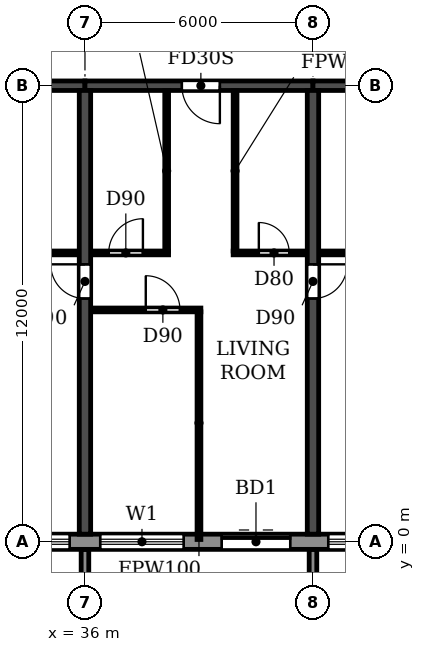
"""IFC4 building model, lengths in metres.
Left out: names, types, materials, properties, quantities, classifications, styles, units other than length and angle.
Written with IfcOpenShell. Run it as: python <this file> out.ifc"""

import sys

from ifc_helpers import new_model, si_unit, direction, frame, frame_2d, origin, place, context, subcontext, project, spatial, polyline, rectangle, outline, extrude, source, transform, mapped, element, fill, save


model = new_model("IFC4")
c1 = context("Model", 3, precision=1e-05, world=origin(), true_north=direction((0.0, 1.0)))
c2 = subcontext(c1, "Body", "Model", "MODEL_VIEW")
j1 = project(units=[si_unit("LENGTHUNIT", "METRE"), si_unit("PLANEANGLEUNIT", "RADIAN")], contexts=[c1])
p1 = place(None, origin())
s1 = spatial("IfcSite", under=j1, at=p1, CompositionType="ELEMENT")
p2 = place(p1, origin())
s2 = spatial("IfcBuilding", under=s1, at=p2, CompositionType="ELEMENT")
p3 = place(p2, frame((0.0, 0.0, 152.1)))
s3 = spatial("IfcBuildingStorey", under=s2, at=p3, CompositionType="ELEMENT", Elevation=152.1)
p4 = place(p3, frame((36.0, 0.2, 0.0), z_axis=(0.0, 0.0, 1.0), x_axis=(0.0, 1.0, 0.0)))
e1 = element("IfcWall", 1, at=p4, inside=s3, PredefinedType="SHEAR", context=c2, shape_type="SweptSolid", body=[
    extrude(rectangle(XDim=11.675, YDim=0.3, at=frame_2d((5.837, 0.0))), origin(), (0.0, 0.0, 1.0), 3.07),
])
p5 = place(p4, frame((6.2, 0.0, 0.0)))
e2 = element("IfcOpeningElement", 2, at=p5, cuts=e1, PredefinedType="OPENING", context=c2, shape_type="SweptSolid", body=[
    extrude(rectangle(XDim=0.9, YDim=2.1, at=frame_2d((0.45, 1.05))), frame((0.0, 0.16, 0.0), z_axis=(0.0, -1.0, 0.0), x_axis=(1.0, 0.0, 0.0)), (0.0, 0.0, 1.0), 0.32),
])
p6 = place(p3, frame((42.0, 0.2, 0.0), z_axis=(0.0, 0.0, 1.0), x_axis=(0.0, 1.0, 0.0)))
e3 = element("IfcWall", 3, at=p6, inside=s3, PredefinedType="SHEAR", context=c2, shape_type="SweptSolid", body=[
    extrude(rectangle(XDim=11.675, YDim=0.3, at=frame_2d((5.837, 0.0))), origin(), (0.0, 0.0, 1.0), 3.07),
])
p7 = place(p6, frame((6.2, 0.0, 0.0)))
e4 = element("IfcOpeningElement", 4, at=p7, cuts=e3, PredefinedType="OPENING", context=c2, shape_type="SweptSolid", body=[
    extrude(rectangle(XDim=0.9, YDim=2.1, at=frame_2d((0.45, 1.05))), frame((0.0, 0.16, 0.0), z_axis=(0.0, -1.0, 0.0), x_axis=(1.0, 0.0, 0.0)), (0.0, 0.0, 1.0), 0.32),
])
p8 = place(p3, frame((30.0, 12.0, 0.0), z_axis=(0.0, 0.0, 1.0), x_axis=(1.0, 0.0, 0.0)))
e5 = element("IfcWall", 5, at=p8, inside=s3, PredefinedType="SHEAR", context=c2, shape_type="SweptSolid", body=[
    extrude(rectangle(XDim=6.0, YDim=0.25, at=frame_2d((3.0, 0.0))), origin(), (0.0, 0.0, 1.0), 2.47),
])
p9 = place(p3, frame((36.0, 12.0, 0.0), z_axis=(0.0, 0.0, 1.0), x_axis=(1.0, 0.0, 0.0)))
e6 = element("IfcWall", 6, at=p9, inside=s3, PredefinedType="SHEAR", context=c2, shape_type="SweptSolid", body=[
    extrude(rectangle(XDim=6.0, YDim=0.25, at=frame_2d((3.0, 0.0))), origin(), (0.0, 0.0, 1.0), 2.47),
])
p10 = place(p9, frame((2.55, 0.0, 0.0)))
e7 = element("IfcOpeningElement", 7, at=p10, cuts=e6, PredefinedType="OPENING", context=c2, shape_type="SweptSolid", body=[
    extrude(rectangle(XDim=1.0, YDim=2.1, at=frame_2d((0.5, 1.05))), frame((0.0, 0.135, 0.0), z_axis=(0.0, -1.0, 0.0), x_axis=(1.0, 0.0, 0.0)), (0.0, 0.0, 1.0), 0.27),
])
p11 = place(p3, frame((42.0, 12.0, 0.0), z_axis=(0.0, 0.0, 1.0), x_axis=(1.0, 0.0, 0.0)))
e8 = element("IfcWall", 8, at=p11, inside=s3, PredefinedType="SHEAR", context=c2, shape_type="SweptSolid", body=[
    extrude(rectangle(XDim=6.0, YDim=0.25, at=frame_2d((3.0, 0.0))), origin(), (0.0, 0.0, 1.0), 2.47),
])
p12 = place(p3, frame((16.683, 0.0, 0.0), z_axis=(0.0, 0.0, 1.0), x_axis=(1.0, 0.0, 0.0)))
e9 = element("IfcWall", 9, at=p12, inside=s3, PredefinedType="STANDARD", context=c2, shape_type="SweptSolid", body=[
    extrude(rectangle(XDim=68.634, YDim=0.4, at=frame_2d((34.317, 0.0))), origin(), (0.0, 0.0, 1.0), 3.07),
])
p13 = place(p12, frame((1.717, 0.0, 0.9)))
e10 = element("IfcOpeningElement", 10, at=p13, cuts=e9, PredefinedType="OPENING", context=c2, shape_type="SweptSolid", body=[
    extrude(rectangle(XDim=2.2, YDim=1.5, at=frame_2d((1.1, 0.75))), frame((0.0, 0.21, 0.0), z_axis=(0.0, -1.0, 0.0), x_axis=(1.0, 0.0, 0.0)), (0.0, 0.0, 1.0), 0.42),
])
p14 = place(p12, frame((4.717, 0.0, 0.9)))
e11 = element("IfcOpeningElement", 11, at=p14, cuts=e9, PredefinedType="OPENING", context=c2, shape_type="SweptSolid", body=[
    extrude(rectangle(XDim=2.2, YDim=1.5, at=frame_2d((1.1, 0.75))), frame((0.0, 0.21, 0.0), z_axis=(0.0, -1.0, 0.0), x_axis=(1.0, 0.0, 0.0)), (0.0, 0.0, 1.0), 0.42),
])
p15 = place(p12, frame((7.917, 0.0, 0.0)))
e12 = element("IfcOpeningElement", 12, at=p15, cuts=e9, PredefinedType="OPENING", context=c2, shape_type="SweptSolid", body=[
    extrude(rectangle(XDim=1.8, YDim=2.4, at=frame_2d((0.9, 1.2))), frame((0.0, 0.21, 0.0), z_axis=(0.0, -1.0, 0.0), x_axis=(1.0, 0.0, 0.0)), (0.0, 0.0, 1.0), 0.42),
])
p16 = place(p12, frame((10.717, 0.0, 0.9)))
e13 = element("IfcOpeningElement", 13, at=p16, cuts=e9, PredefinedType="OPENING", context=c2, shape_type="SweptSolid", body=[
    extrude(rectangle(XDim=2.2, YDim=1.5, at=frame_2d((1.1, 0.75))), frame((0.0, 0.21, 0.0), z_axis=(0.0, -1.0, 0.0), x_axis=(1.0, 0.0, 0.0)), (0.0, 0.0, 1.0), 0.42),
])
p17 = place(p12, frame((13.717, 0.0, 0.9)))
e14 = element("IfcOpeningElement", 14, at=p17, cuts=e9, PredefinedType="OPENING", context=c2, shape_type="SweptSolid", body=[
    extrude(rectangle(XDim=2.2, YDim=1.5, at=frame_2d((1.1, 0.75))), frame((0.0, 0.21, 0.0), z_axis=(0.0, -1.0, 0.0), x_axis=(1.0, 0.0, 0.0)), (0.0, 0.0, 1.0), 0.42),
])
p18 = place(p12, frame((16.717, 0.0, 0.9)))
e15 = element("IfcOpeningElement", 15, at=p18, cuts=e9, PredefinedType="OPENING", context=c2, shape_type="SweptSolid", body=[
    extrude(rectangle(XDim=2.2, YDim=1.5, at=frame_2d((1.1, 0.75))), frame((0.0, 0.21, 0.0), z_axis=(0.0, -1.0, 0.0), x_axis=(1.0, 0.0, 0.0)), (0.0, 0.0, 1.0), 0.42),
])
p19 = place(p12, frame((19.717, 0.0, 0.9)))
e16 = element("IfcOpeningElement", 16, at=p19, cuts=e9, PredefinedType="OPENING", context=c2, shape_type="SweptSolid", body=[
    extrude(rectangle(XDim=2.2, YDim=1.5, at=frame_2d((1.1, 0.75))), frame((0.0, 0.21, 0.0), z_axis=(0.0, -1.0, 0.0), x_axis=(1.0, 0.0, 0.0)), (0.0, 0.0, 1.0), 0.42),
])
p20 = place(p12, frame((22.917, 0.0, 0.0)))
e17 = element("IfcOpeningElement", 17, at=p20, cuts=e9, PredefinedType="OPENING", context=c2, shape_type="SweptSolid", body=[
    extrude(rectangle(XDim=1.8, YDim=2.4, at=frame_2d((0.9, 1.2))), frame((0.0, 0.21, 0.0), z_axis=(0.0, -1.0, 0.0), x_axis=(1.0, 0.0, 0.0)), (0.0, 0.0, 1.0), 0.42),
])
p21 = place(p12, frame((25.717, 0.0, 0.9)))
e18 = element("IfcOpeningElement", 18, at=p21, cuts=e9, PredefinedType="OPENING", context=c2, shape_type="SweptSolid", body=[
    extrude(rectangle(XDim=2.2, YDim=1.5, at=frame_2d((1.1, 0.75))), frame((0.0, 0.21, 0.0), z_axis=(0.0, -1.0, 0.0), x_axis=(1.0, 0.0, 0.0)), (0.0, 0.0, 1.0), 0.42),
])
p22 = place(p12, frame((28.717, 0.0, 0.9)))
e19 = element("IfcOpeningElement", 19, at=p22, cuts=e9, PredefinedType="OPENING", context=c2, shape_type="SweptSolid", body=[
    extrude(rectangle(XDim=2.2, YDim=1.5, at=frame_2d((1.1, 0.75))), frame((0.0, 0.21, 0.0), z_axis=(0.0, -1.0, 0.0), x_axis=(1.0, 0.0, 0.0)), (0.0, 0.0, 1.0), 0.42),
])
p23 = place(p12, frame((31.917, 0.0, 0.0)))
e20 = element("IfcOpeningElement", 20, at=p23, cuts=e9, PredefinedType="OPENING", context=c2, shape_type="SweptSolid", body=[
    extrude(rectangle(XDim=1.8, YDim=2.4, at=frame_2d((0.9, 1.2))), frame((0.0, 0.21, 0.0), z_axis=(0.0, -1.0, 0.0), x_axis=(1.0, 0.0, 0.0)), (0.0, 0.0, 1.0), 0.42),
])
p24 = place(p12, frame((34.717, 0.0, 0.9)))
e21 = element("IfcOpeningElement", 21, at=p24, cuts=e9, PredefinedType="OPENING", context=c2, shape_type="SweptSolid", body=[
    extrude(rectangle(XDim=2.2, YDim=1.5, at=frame_2d((1.1, 0.75))), frame((0.0, 0.21, 0.0), z_axis=(0.0, -1.0, 0.0), x_axis=(1.0, 0.0, 0.0)), (0.0, 0.0, 1.0), 0.42),
])
p25 = place(p12, frame((37.717, 0.0, 0.9)))
e22 = element("IfcOpeningElement", 22, at=p25, cuts=e9, PredefinedType="OPENING", context=c2, shape_type="SweptSolid", body=[
    extrude(rectangle(XDim=2.2, YDim=1.5, at=frame_2d((1.1, 0.75))), frame((0.0, 0.21, 0.0), z_axis=(0.0, -1.0, 0.0), x_axis=(1.0, 0.0, 0.0)), (0.0, 0.0, 1.0), 0.42),
])
p26 = place(p12, frame((40.717, 0.0, 0.9)))
e23 = element("IfcOpeningElement", 23, at=p26, cuts=e9, PredefinedType="OPENING", context=c2, shape_type="SweptSolid", body=[
    extrude(rectangle(XDim=2.2, YDim=1.5, at=frame_2d((1.1, 0.75))), frame((0.0, 0.21, 0.0), z_axis=(0.0, -1.0, 0.0), x_axis=(1.0, 0.0, 0.0)), (0.0, 0.0, 1.0), 0.42),
])
p27 = place(p12, frame((43.717, 0.0, 0.9)))
e24 = element("IfcOpeningElement", 24, at=p27, cuts=e9, PredefinedType="OPENING", context=c2, shape_type="SweptSolid", body=[
    extrude(rectangle(XDim=2.2, YDim=1.5, at=frame_2d((1.1, 0.75))), frame((0.0, 0.21, 0.0), z_axis=(0.0, -1.0, 0.0), x_axis=(1.0, 0.0, 0.0)), (0.0, 0.0, 1.0), 0.42),
])
p28 = place(p12, frame((46.917, 0.0, 0.0)))
e25 = element("IfcOpeningElement", 25, at=p28, cuts=e9, PredefinedType="OPENING", context=c2, shape_type="SweptSolid", body=[
    extrude(rectangle(XDim=1.8, YDim=2.4, at=frame_2d((0.9, 1.2))), frame((0.0, 0.21, 0.0), z_axis=(0.0, -1.0, 0.0), x_axis=(1.0, 0.0, 0.0)), (0.0, 0.0, 1.0), 0.42),
])
p29 = place(p12, frame((49.717, 0.0, 0.9)))
e26 = element("IfcOpeningElement", 26, at=p29, cuts=e9, PredefinedType="OPENING", context=c2, shape_type="SweptSolid", body=[
    extrude(rectangle(XDim=2.2, YDim=1.5, at=frame_2d((1.1, 0.75))), frame((0.0, 0.21, 0.0), z_axis=(0.0, -1.0, 0.0), x_axis=(1.0, 0.0, 0.0)), (0.0, 0.0, 1.0), 0.42),
])
p30 = place(p12, frame((52.717, 0.0, 0.9)))
e27 = element("IfcOpeningElement", 27, at=p30, cuts=e9, PredefinedType="OPENING", context=c2, shape_type="SweptSolid", body=[
    extrude(rectangle(XDim=2.2, YDim=1.5, at=frame_2d((1.1, 0.75))), frame((0.0, 0.21, 0.0), z_axis=(0.0, -1.0, 0.0), x_axis=(1.0, 0.0, 0.0)), (0.0, 0.0, 1.0), 0.42),
])
p31 = place(p12, frame((55.717, 0.0, 0.9)))
e28 = element("IfcOpeningElement", 28, at=p31, cuts=e9, PredefinedType="OPENING", context=c2, shape_type="SweptSolid", body=[
    extrude(rectangle(XDim=2.2, YDim=1.5, at=frame_2d((1.1, 0.75))), frame((0.0, 0.21, 0.0), z_axis=(0.0, -1.0, 0.0), x_axis=(1.0, 0.0, 0.0)), (0.0, 0.0, 1.0), 0.42),
])
p32 = place(p12, frame((58.917, 0.0, 0.0)))
e29 = element("IfcOpeningElement", 29, at=p32, cuts=e9, PredefinedType="OPENING", context=c2, shape_type="SweptSolid", body=[
    extrude(rectangle(XDim=1.8, YDim=2.4, at=frame_2d((0.9, 1.2))), frame((0.0, 0.21, 0.0), z_axis=(0.0, -1.0, 0.0), x_axis=(1.0, 0.0, 0.0)), (0.0, 0.0, 1.0), 0.42),
])
p33 = place(p12, frame((61.717, 0.0, 0.9)))
e30 = element("IfcOpeningElement", 30, at=p33, cuts=e9, PredefinedType="OPENING", context=c2, shape_type="SweptSolid", body=[
    extrude(rectangle(XDim=2.2, YDim=1.5, at=frame_2d((1.1, 0.75))), frame((0.0, 0.21, 0.0), z_axis=(0.0, -1.0, 0.0), x_axis=(1.0, 0.0, 0.0)), (0.0, 0.0, 1.0), 0.42),
])
p34 = place(p12, frame((64.717, 0.0, 0.9)))
e31 = element("IfcOpeningElement", 31, at=p34, cuts=e9, PredefinedType="OPENING", context=c2, shape_type="SweptSolid", body=[
    extrude(rectangle(XDim=2.2, YDim=1.5, at=frame_2d((1.1, 0.75))), frame((0.0, 0.21, 0.0), z_axis=(0.0, -1.0, 0.0), x_axis=(1.0, 0.0, 0.0)), (0.0, 0.0, 1.0), 0.42),
])
m1 = source(origin(), c2, "Body", "SweptSolid", [
    extrude(outline(polyline([(0.0, 0.0), (0.2, 0.0), (0.2, 1.65), (0.0, 1.65), (0.0, 0.0)])), origin(), (0.0, 0.0, 1.0), 3.1),
])
for number, where in (
    (32, (35.9, -1.85, 0.0)),
    (33, (41.9, -1.85, 0.0)),
):
    element("IfcWall", number, at=place(p3, frame(where)), inside=s3, PredefinedType="STANDARD", context=c2, shape_type="MappedRepresentation", body=[
        mapped(m1, transform((0.0, 0.0, 0.0))),
    ])
p35 = place(p3, frame((36.16, 6.1, 0.0), z_axis=(0.0, 0.0, 1.0), x_axis=(1.0, 0.0, 0.0)))
e34 = element("IfcWall", 34, at=p35, inside=s3, PredefinedType="PARTITIONING", context=c2, shape_type="SweptSolid", body=[
    extrude(rectangle(XDim=2.89, YDim=0.1, at=frame_2d((1.445, 0.0))), origin(), (0.0, 0.0, 1.0), 3.07),
])
p36 = place(p35, frame((1.44, 0.0, 0.0)))
e35 = element("IfcOpeningElement", 35, at=p36, cuts=e34, PredefinedType="OPENING", context=c2, shape_type="SweptSolid", body=[
    extrude(rectangle(XDim=0.9, YDim=2.1, at=frame_2d((0.45, 1.05))), frame((0.0, 0.06, 0.0), z_axis=(0.0, -1.0, 0.0), x_axis=(1.0, 0.0, 0.0)), (0.0, 0.0, 1.0), 0.12),
])
p37 = place(p3, frame((32.9, 7.6, 0.0), z_axis=(0.0, 0.0, 1.0), x_axis=(1.0, 0.0, 0.0)))
e36 = element("IfcWall", 36, at=p37, inside=s3, PredefinedType="PARTITIONING", context=c2, shape_type="SweptSolid", body=[
    extrude(rectangle(XDim=2.94, YDim=0.1, at=frame_2d((1.47, 0.0))), origin(), (0.0, 0.0, 1.0), 3.07),
])
p38 = place(p37, frame((1.2, 0.0, 0.0)))
e37 = element("IfcOpeningElement", 37, at=p38, cuts=e36, PredefinedType="OPENING", context=c2, shape_type="SweptSolid", body=[
    extrude(rectangle(XDim=0.8, YDim=2.1, at=frame_2d((0.4, 1.05))), frame((0.0, 0.06, 0.0), z_axis=(0.0, -1.0, 0.0), x_axis=(1.0, 0.0, 0.0)), (0.0, 0.0, 1.0), 0.12),
])
p39 = place(p3, frame((36.16, 7.6, 0.0), z_axis=(0.0, 0.0, 1.0), x_axis=(1.0, 0.0, 0.0)))
e38 = element("IfcWall", 38, at=p39, inside=s3, PredefinedType="PARTITIONING", context=c2, shape_type="SweptSolid", body=[
    extrude(rectangle(XDim=2.04, YDim=0.1, at=frame_2d((1.02, 0.0))), origin(), (0.0, 0.0, 1.0), 3.07),
])
p40 = place(p39, frame((0.465, 0.0, 0.0)))
e39 = element("IfcOpeningElement", 39, at=p40, cuts=e38, PredefinedType="OPENING", context=c2, shape_type="SweptSolid", body=[
    extrude(rectangle(XDim=0.9, YDim=2.1, at=frame_2d((0.45, 1.05))), frame((0.0, 0.06, 0.0), z_axis=(0.0, -1.0, 0.0), x_axis=(1.0, 0.0, 0.0)), (0.0, 0.0, 1.0), 0.12),
])
p41 = place(p3, frame((39.9, 7.6, 0.0), z_axis=(0.0, 0.0, 1.0), x_axis=(1.0, 0.0, 0.0)))
e40 = element("IfcWall", 40, at=p41, inside=s3, PredefinedType="PARTITIONING", context=c2, shape_type="SweptSolid", body=[
    extrude(rectangle(XDim=1.94, YDim=0.1, at=frame_2d((0.97, 0.0))), origin(), (0.0, 0.0, 1.0), 3.07),
])
p42 = place(p41, frame((0.675, 0.0, 0.0)))
e41 = element("IfcOpeningElement", 41, at=p42, cuts=e40, PredefinedType="OPENING", context=c2, shape_type="SweptSolid", body=[
    extrude(rectangle(XDim=0.8, YDim=2.1, at=frame_2d((0.4, 1.05))), frame((0.0, 0.06, 0.0), z_axis=(0.0, -1.0, 0.0), x_axis=(1.0, 0.0, 0.0)), (0.0, 0.0, 1.0), 0.12),
])
p43 = place(p3, frame((42.16, 7.6, 0.0), z_axis=(0.0, 0.0, 1.0), x_axis=(1.0, 0.0, 0.0)))
e42 = element("IfcWall", 42, at=p43, inside=s3, PredefinedType="PARTITIONING", context=c2, shape_type="SweptSolid", body=[
    extrude(rectangle(XDim=2.74, YDim=0.1, at=frame_2d((1.37, 0.0))), origin(), (0.0, 0.0, 1.0), 3.07),
])
p44 = place(p43, frame((0.94, 0.0, 0.0)))
e43 = element("IfcOpeningElement", 43, at=p44, cuts=e42, PredefinedType="OPENING", context=c2, shape_type="SweptSolid", body=[
    extrude(rectangle(XDim=0.8, YDim=2.1, at=frame_2d((0.4, 1.05))), frame((0.0, 0.06, 0.0), z_axis=(0.0, -1.0, 0.0), x_axis=(1.0, 0.0, 0.0)), (0.0, 0.0, 1.0), 0.12),
])
p45 = place(p3, frame((38.15, 7.65, 0.0), z_axis=(0.0, 0.0, 1.0), x_axis=(0.0, 1.0, 0.0)))
e44 = element("IfcWall", 44, at=p45, inside=s3, PredefinedType="PARTITIONING", context=c2, shape_type="SweptSolid", body=[
    extrude(rectangle(XDim=4.215, YDim=0.1, at=frame_2d((2.107, 0.0))), origin(), (0.0, 0.0, 1.0), 3.07),
])
p46 = place(p3, frame((39.0, 0.06, 0.0), z_axis=(0.0, 0.0, 1.0), x_axis=(0.0, 1.0, 0.0)))
e45 = element("IfcWall", 45, at=p46, inside=s3, PredefinedType="PARTITIONING", context=c2, shape_type="SweptSolid", body=[
    extrude(rectangle(XDim=5.99, YDim=0.1, at=frame_2d((2.995, 0.0))), origin(), (0.0, 0.0, 1.0), 3.07),
])
p47 = place(p3, frame((39.95, 7.65, 0.0), z_axis=(0.0, 0.0, 1.0), x_axis=(0.0, 1.0, 0.0)))
e46 = element("IfcWall", 46, at=p47, inside=s3, PredefinedType="PARTITIONING", context=c2, shape_type="SweptSolid", body=[
    extrude(rectangle(XDim=4.215, YDim=0.1, at=frame_2d((2.107, 0.0))), origin(), (0.0, 0.0, 1.0), 3.07),
])
p48 = place(p18, origin())
e47 = element("IfcWindow", 47, at=p48, inside=s3, PartitioningType="DOUBLE_PANEL_HORIZONTAL", PredefinedType="WINDOW", context=c2, shape_type="SweptSolid", body=[
    extrude(rectangle(XDim=2.2, YDim=1.5, at=frame_2d((1.1, 0.75))), frame((0.0, 0.03, 0.0), z_axis=(0.0, -1.0, 0.0), x_axis=(1.0, 0.0, 0.0)), (0.0, 0.0, 1.0), 0.06),
])
fill(e15, e47)
p49 = place(p19, origin())
e48 = element("IfcWindow", 48, at=p49, inside=s3, PartitioningType="DOUBLE_PANEL_HORIZONTAL", PredefinedType="WINDOW", context=c2, shape_type="SweptSolid", body=[
    extrude(rectangle(XDim=2.2, YDim=1.5, at=frame_2d((1.1, 0.75))), frame((0.0, 0.03, 0.0), z_axis=(0.0, -1.0, 0.0), x_axis=(1.0, 0.0, 0.0)), (0.0, 0.0, 1.0), 0.06),
])
fill(e16, e48)
p50 = place(p20, origin())
e49 = element("IfcDoor", 49, at=p50, inside=s3, OperationType="DOUBLE_DOOR_SLIDING", PredefinedType="DOOR", context=c2, shape_type="SweptSolid", body=[
    extrude(rectangle(XDim=1.8, YDim=2.4, at=frame_2d((0.9, 1.2))), frame((0.0, 0.025, 0.0), z_axis=(0.0, -1.0, 0.0), x_axis=(1.0, 0.0, 0.0)), (0.0, 0.0, 1.0), 0.05),
])
fill(e17, e49)
p51 = place(p21, origin())
e50 = element("IfcWindow", 50, at=p51, inside=s3, PartitioningType="DOUBLE_PANEL_HORIZONTAL", PredefinedType="WINDOW", context=c2, shape_type="SweptSolid", body=[
    extrude(rectangle(XDim=2.2, YDim=1.5, at=frame_2d((1.1, 0.75))), frame((0.0, 0.03, 0.0), z_axis=(0.0, -1.0, 0.0), x_axis=(1.0, 0.0, 0.0)), (0.0, 0.0, 1.0), 0.06),
])
fill(e18, e50)
p52 = place(p5, origin())
e51 = element("IfcDoor", 51, at=p52, inside=s3, OperationType="SINGLE_SWING_RIGHT", PredefinedType="DOOR", context=c2, shape_type="SweptSolid", body=[
    extrude(rectangle(XDim=0.9, YDim=2.1, at=frame_2d((0.45, 1.05))), frame((0.0, 0.025, 0.0), z_axis=(0.0, -1.0, 0.0), x_axis=(1.0, 0.0, 0.0)), (0.0, 0.0, 1.0), 0.05),
])
fill(e2, e51)
p53 = place(p40, origin())
e52 = element("IfcDoor", 52, at=p53, inside=s3, OperationType="SINGLE_SWING_RIGHT", PredefinedType="DOOR", context=c2, shape_type="SweptSolid", body=[
    extrude(rectangle(XDim=0.9, YDim=2.1, at=frame_2d((0.45, 1.05))), frame((0.0, 0.025, 0.0), z_axis=(0.0, -1.0, 0.0), x_axis=(1.0, 0.0, 0.0)), (0.0, 0.0, 1.0), 0.05),
])
fill(e39, e52)
p54 = place(p36, origin())
e53 = element("IfcDoor", 53, at=p54, inside=s3, OperationType="SINGLE_SWING_LEFT", PredefinedType="DOOR", context=c2, shape_type="SweptSolid", body=[
    extrude(rectangle(XDim=0.9, YDim=2.1, at=frame_2d((0.45, 1.05))), frame((0.0, 0.025, 0.0), z_axis=(0.0, -1.0, 0.0), x_axis=(1.0, 0.0, 0.0)), (0.0, 0.0, 1.0), 0.05),
])
fill(e35, e53)
p55 = place(p10, frame((1.0, 0.0, 0.0), z_axis=(0.0, 0.0, 1.0), x_axis=(-1.0, 0.0, 0.0)))
e54 = element("IfcDoor", 54, at=p55, inside=s3, OperationType="SINGLE_SWING_LEFT", PredefinedType="DOOR", context=c2, shape_type="SweptSolid", body=[
    extrude(rectangle(XDim=1.0, YDim=2.1, at=frame_2d((0.5, 1.05))), frame((0.0, 0.025, 0.0), z_axis=(0.0, -1.0, 0.0), x_axis=(1.0, 0.0, 0.0)), (0.0, 0.0, 1.0), 0.05),
])
fill(e7, e54)
p56 = place(p42, origin())
e55 = element("IfcDoor", 55, at=p56, inside=s3, OperationType="SINGLE_SWING_LEFT", PredefinedType="DOOR", context=c2, shape_type="SweptSolid", body=[
    extrude(rectangle(XDim=0.8, YDim=2.1, at=frame_2d((0.4, 1.05))), frame((0.0, 0.025, 0.0), z_axis=(0.0, -1.0, 0.0), x_axis=(1.0, 0.0, 0.0)), (0.0, 0.0, 1.0), 0.05),
])
fill(e41, e55)
p57 = place(p7, frame((0.9, 0.0, 0.0), z_axis=(0.0, 0.0, 1.0), x_axis=(-1.0, 0.0, 0.0)))
e56 = element("IfcDoor", 56, at=p57, inside=s3, OperationType="SINGLE_SWING_LEFT", PredefinedType="DOOR", context=c2, shape_type="SweptSolid", body=[
    extrude(rectangle(XDim=0.9, YDim=2.1, at=frame_2d((0.45, 1.05))), frame((0.0, 0.025, 0.0), z_axis=(0.0, -1.0, 0.0), x_axis=(1.0, 0.0, 0.0)), (0.0, 0.0, 1.0), 0.05),
])
fill(e4, e56)
save(model, sys.argv[1])
